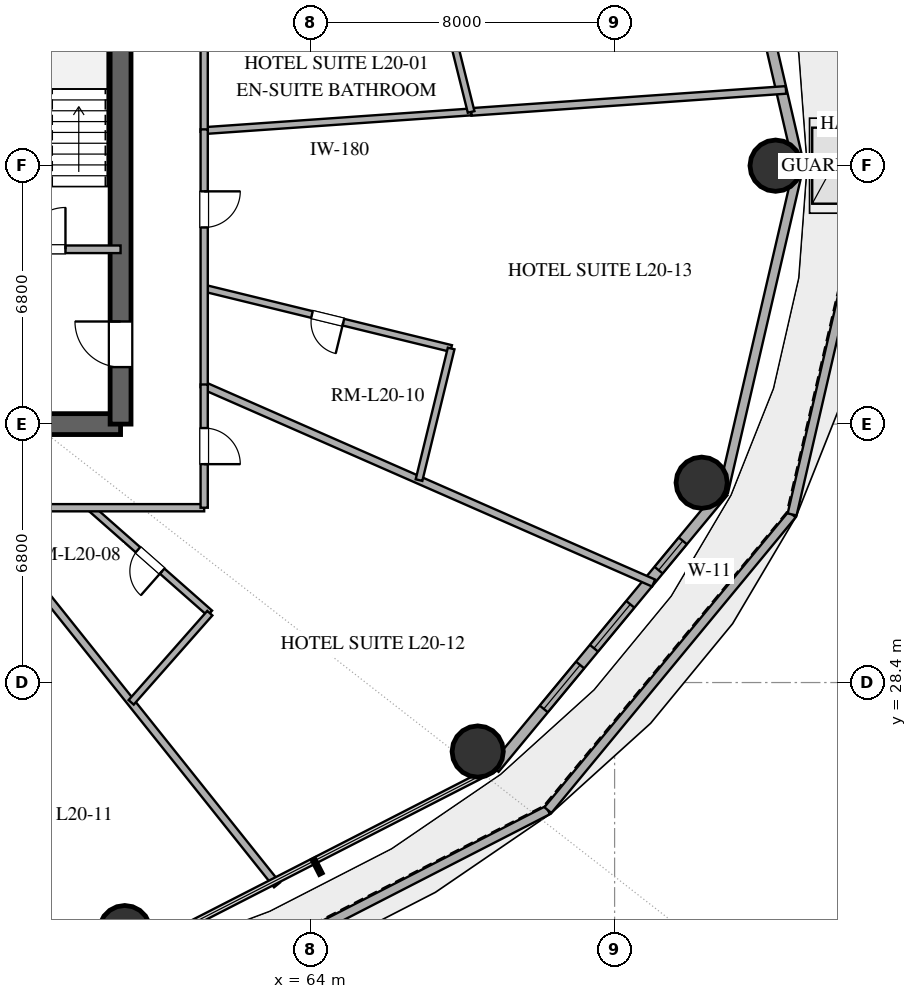
"""IFC4 building model, lengths in metres.
Left out: names, types, materials, properties, quantities, classifications, styles, units other than length and angle.
Written with IfcOpenShell. Run it as: python <this file> out.ifc"""

import sys

from ifc_helpers import new_model, si_unit, direction, frame, frame_2d, origin, origin_2d, place, context, subcontext, project, spatial, rectangle, hollow_circle, extrude, element, fill, save


model = new_model("IFC4")
c1 = context("Model", 3, precision=1e-05, world=origin(), true_north=direction((0.0, 1.0)))
c2 = subcontext(c1, "Body", "Model", "MODEL_VIEW")
j1 = project(units=[si_unit("LENGTHUNIT", "METRE"), si_unit("PLANEANGLEUNIT", "RADIAN")], contexts=[c1])
p1 = place(None, origin())
s1 = spatial("IfcSite", under=j1, at=p1, CompositionType="ELEMENT")
p2 = place(p1, origin())
s2 = spatial("IfcBuilding", under=s1, at=p2, CompositionType="ELEMENT")
p3 = place(p2, frame((0.0, 0.0, 84.0)))
s3 = spatial("IfcBuildingStorey", under=s2, at=p3, CompositionType="ELEMENT", Elevation=84.0)
p4 = place(p3, frame((55.0, 35.2, 0.0), z_axis=(0.0, 0.0, 1.0), x_axis=(1.0, 0.0, 0.0)))
e1 = element("IfcWall", 1, at=p4, inside=s3, PredefinedType="SHEAR", context=c2, shape_type="SweptSolid", body=[
    extrude(rectangle(XDim=4.0, YDim=0.55, at=frame_2d((2.0, 0.0))), origin(), (0.0, 0.0, 1.0), 3.38),
])
p5 = place(p3, frame((59.0, 35.2, 0.0), z_axis=(0.0, 0.0, 1.0), x_axis=(0.0, 1.0, 0.0)))
e2 = element("IfcWall", 2, at=p5, inside=s3, PredefinedType="SHEAR", context=c2, shape_type="SweptSolid", body=[
    extrude(rectangle(XDim=13.6, YDim=0.55, at=frame_2d((6.8, 0.0))), origin(), (0.0, 0.0, 1.0), 3.38),
])
p6 = place(p5, frame((1.5, 0.0, 0.0)))
e3 = element("IfcOpeningElement", 3, at=p6, cuts=e2, PredefinedType="OPENING", context=c2, shape_type="SweptSolid", body=[
    extrude(rectangle(XDim=1.2, YDim=2.15, at=frame_2d((0.6, 1.075))), frame((0.0, 0.285, 0.0), z_axis=(0.0, -1.0, 0.0), x_axis=(1.0, 0.0, 0.0)), (0.0, 0.0, 1.0), 0.57),
])
for number, where, z_axis, x_axis in (
    (4, (76.237, 42.0, 0.0), (0.0, 0.0, 1.0), (1.0, 0.0, 0.0)),
    (5, (59.11, 21.859, 0.0), (0.0, 0.0, 1.0), (1.0, 0.0, 0.0)),
    (6, (68.398, 26.585, 0.0), (0.0, 0.0, 1.0), (1.0, 0.0, 0.0)),
    (7, (74.291, 33.657, 0.0), (0.0, 0.0, 1.0), (1.0, 0.0, 0.0)),
):
    element("IfcColumn", number, at=place(p3, frame(where, z_axis=z_axis, x_axis=x_axis)), inside=s3, PredefinedType="COLUMN", context=c2, shape_type="SweptSolid", body=[
        extrude(hollow_circle(Radius=0.675, WallThickness=0.036, at=origin_2d()), origin(), (0.0, 0.0, 1.0), 3.38),
    ])
p7 = place(p3, frame((78.793, 42.0, 0.0), z_axis=(0.0, 0.0, 1.0), x_axis=(-0.225249461705, 0.974301123884, 0.0)))
e8 = element("IfcWall", 8, at=p7, inside=s3, PredefinedType="PARAPET", context=c2, shape_type="SweptSolid", body=[
    extrude(rectangle(XDim=9.419, YDim=0.24, at=frame_2d((4.709, 0.0))), origin(), (0.0, 0.0, 1.0), 1.25),
])
p8 = place(p3, frame((60.116, 19.845, 0.0), z_axis=(0.0, 0.0, 1.0), x_axis=(0.889663800129, 0.456616165658, 0.0)))
e9 = element("IfcWall", 9, at=p8, inside=s3, PredefinedType="PARAPET", context=c2, shape_type="SweptSolid", body=[
    extrude(rectangle(XDim=11.384, YDim=0.24, at=frame_2d((5.692, 0.0))), origin(), (0.0, 0.0, 1.0), 1.25),
])
p9 = place(p3, frame((70.244, 25.044, 0.0), z_axis=(0.0, 0.0, 1.0), x_axis=(0.636906456166, 0.770941091196, 0.0)))
e10 = element("IfcWall", 10, at=p9, inside=s3, PredefinedType="PARAPET", context=c2, shape_type="SweptSolid", body=[
    extrude(rectangle(XDim=10.091, YDim=0.24, at=frame_2d((5.045, 0.0))), origin(), (0.0, 0.0, 1.0), 1.25),
])
p10 = place(p3, frame((76.671, 32.823, 0.0), z_axis=(0.0, 0.0, 1.0), x_axis=(0.225249461705, 0.974301123884, 0.0)))
e11 = element("IfcWall", 11, at=p10, inside=s3, PredefinedType="PARAPET", context=c2, shape_type="SweptSolid", body=[
    extrude(rectangle(XDim=9.419, YDim=0.24, at=frame_2d((4.709, 0.0))), origin(), (0.0, 0.0, 1.0), 1.25),
])
p11 = place(p3, frame((76.849, 42.0, 0.0), z_axis=(0.0, 0.0, 1.0), x_axis=(-0.22558597182, 0.974223264616, 0.0)))
e12 = element("IfcWall", 12, at=p11, inside=s3, PredefinedType="SOLIDWALL", context=c2, shape_type="SweptSolid", body=[
    extrude(rectangle(XDim=8.811, YDim=0.28, at=frame_2d((4.405, 0.0))), origin(), (0.0, 0.0, 1.0), 3.38),
])
p12 = place(p11, frame((5.675, 0.0, 0.0)))
e13 = element("IfcOpeningElement", 13, at=p12, cuts=e12, PredefinedType="OPENING", context=c2, shape_type="SweptSolid", body=[
    extrude(rectangle(XDim=1.6, YDim=2.25, at=frame_2d((0.8, 1.125))), frame((0.0, 0.15, 0.0), z_axis=(0.0, -1.0, 0.0), x_axis=(1.0, 0.0, 0.0)), (0.0, 0.0, 1.0), 0.3),
])
p13 = place(p3, frame((68.84, 26.14, 0.0), z_axis=(0.0, 0.0, 1.0), x_axis=(0.637505817448, 0.770445541696, 0.0)))
e14 = element("IfcWall", 14, at=p13, inside=s3, PredefinedType="SOLIDWALL", context=c2, shape_type="SweptSolid", body=[
    extrude(rectangle(XDim=9.445, YDim=0.28, at=frame_2d((4.723, 0.0))), origin(), (0.0, 0.0, 1.0), 3.38),
])
p14 = place(p13, frame((2.033, 0.0, 0.85)))
e15 = element("IfcOpeningElement", 15, at=p14, cuts=e14, PredefinedType="OPENING", context=c2, shape_type="SweptSolid", body=[
    extrude(rectangle(XDim=1.5, YDim=2.0, at=frame_2d((0.75, 1.0))), frame((0.0, 0.15, 0.0), z_axis=(0.0, -1.0, 0.0), x_axis=(1.0, 0.0, 0.0)), (0.0, 0.0, 1.0), 0.3),
])
p15 = place(p13, frame((4.105, 0.0, 0.85)))
e16 = element("IfcOpeningElement", 16, at=p15, cuts=e14, PredefinedType="OPENING", context=c2, shape_type="SweptSolid", body=[
    extrude(rectangle(XDim=1.5, YDim=2.0, at=frame_2d((0.75, 1.0))), frame((0.0, 0.15, 0.0), z_axis=(0.0, -1.0, 0.0), x_axis=(1.0, 0.0, 0.0)), (0.0, 0.0, 1.0), 0.3),
])
p16 = place(p13, frame((6.772, 0.0, 0.85)))
e17 = element("IfcOpeningElement", 17, at=p16, cuts=e14, PredefinedType="OPENING", context=c2, shape_type="SweptSolid", body=[
    extrude(rectangle(XDim=1.0, YDim=1.8, at=frame_2d((0.5, 0.9))), frame((0.0, 0.15, 0.0), z_axis=(0.0, -1.0, 0.0), x_axis=(1.0, 0.0, 0.0)), (0.0, 0.0, 1.0), 0.3),
])
p17 = place(p3, frame((74.861, 33.417, 0.0), z_axis=(0.0, 0.0, 1.0), x_axis=(0.22558597182, 0.974223264616, 0.0)))
e18 = element("IfcWall", 18, at=p17, inside=s3, PredefinedType="SOLIDWALL", context=c2, shape_type="SweptSolid", body=[
    extrude(rectangle(XDim=8.811, YDim=0.25, at=frame_2d((4.405, 0.0))), origin(), (0.0, 0.0, 1.0), 3.38),
])
p18 = place(p3, frame((55.0, 39.8, 0.0), z_axis=(0.0, 0.0, 1.0), x_axis=(1.0, 0.0, 0.0)))
e19 = element("IfcWall", 19, at=p18, inside=s3, PredefinedType="SOLIDWALL", context=c2, shape_type="SweptSolid", body=[
    extrude(rectangle(XDim=4.0, YDim=0.2, at=frame_2d((2.0, 0.0))), origin(), (0.0, 0.0, 1.0), 2.74),
])
p19 = place(p18, frame((1.45, 0.0, 0.0)))
e20 = element("IfcOpeningElement", 20, at=p19, cuts=e19, PredefinedType="OPENING", context=c2, shape_type="SweptSolid", body=[
    extrude(rectangle(XDim=1.1, YDim=2.15, at=frame_2d((0.55, 1.075))), frame((0.0, 0.11, 0.0), z_axis=(0.0, -1.0, 0.0), x_axis=(1.0, 0.0, 0.0)), (0.0, 0.0, 1.0), 0.22),
])
p20 = place(p3, frame((76.509, 43.994, 0.0), z_axis=(0.0, 0.0, 1.0), x_axis=(-0.997563838401, -0.069759503404, 0.0)))
e21 = element("IfcWall", 21, at=p20, inside=s3, PredefinedType="PARTITIONING", context=c2, shape_type="SweptSolid", body=[
    extrude(rectangle(XDim=8.305, YDim=0.2, at=frame_2d((4.152, 0.0))), origin(), (0.0, 0.0, 1.0), 2.74),
])
p21 = place(p3, frame((68.224, 43.414, 0.0), z_axis=(0.0, 0.0, 1.0), x_axis=(-0.997563891584, -0.06975874287, 0.0)))
e22 = element("IfcWall", 22, at=p21, inside=s3, PredefinedType="PLUMBINGWALL", context=c2, shape_type="SweptSolid", body=[
    extrude(rectangle(XDim=7.042, YDim=0.18, at=frame_2d((3.521, 0.0))), origin(), (0.0, 0.0, 1.0), 2.74),
])
p22 = place(p3, frame((61.2, 36.208, 0.0), z_axis=(0.0, 0.0, 1.0), x_axis=(0.915722078144, -0.401812239235, 0.0)))
e23 = element("IfcWall", 23, at=p22, inside=s3, PredefinedType="PARTITIONING", context=c2, shape_type="SweptSolid", body=[
    extrude(rectangle(XDim=12.915, YDim=0.2, at=frame_2d((6.458, 0.0))), origin(), (0.0, 0.0, 1.0), 2.74),
])
p23 = place(p3, frame((67.699, 37.189, 0.0), z_axis=(0.0, 0.0, 1.0), x_axis=(-0.971448370468, 0.237251055878, 0.0)))
e24 = element("IfcWall", 24, at=p23, inside=s3, PredefinedType="PLUMBINGWALL", context=c2, shape_type="SweptSolid", body=[
    extrude(rectangle(XDim=6.69, YDim=0.18, at=frame_2d((3.345, 0.0))), origin(), (0.0, 0.0, 1.0), 2.74),
])
p24 = place(p23, frame((2.92, 0.0, 0.0)))
e25 = element("IfcOpeningElement", 25, at=p24, cuts=e24, PredefinedType="OPENING", context=c2, shape_type="SweptSolid", body=[
    extrude(rectangle(XDim=0.85, YDim=2.1, at=frame_2d((0.425, 1.05))), frame((0.0, 0.1, 0.0), z_axis=(0.0, -1.0, 0.0), x_axis=(1.0, 0.0, 0.0)), (0.0, 0.0, 1.0), 0.2),
])
p25 = place(p3, frame((55.189, 33.0, 0.0), z_axis=(0.0, 0.0, 1.0), x_axis=(0.624085468444, -0.781356082767, 0.0)))
e26 = element("IfcWall", 26, at=p25, inside=s3, PredefinedType="PARTITIONING", context=c2, shape_type="SweptSolid", body=[
    extrude(rectangle(XDim=12.703, YDim=0.2, at=frame_2d((6.352, 0.0))), origin(), (0.0, 0.0, 1.0), 2.74),
])
p26 = place(p3, frame((61.2, 51.0, 0.0), z_axis=(0.0, 0.0, 1.0), x_axis=(0.0, -1.0, 0.0)))
e27 = element("IfcWall", 27, at=p26, inside=s3, PredefinedType="PARTITIONING", context=c2, shape_type="SweptSolid", body=[
    extrude(rectangle(XDim=8.109, YDim=0.19, at=frame_2d((4.055, 0.0))), origin(), (0.0, 0.0, 1.0), 2.74),
])
p27 = place(p26, frame((2.806, 0.0, 0.0)))
e28 = element("IfcOpeningElement", 28, at=p27, cuts=e27, PredefinedType="OPENING", context=c2, shape_type="SweptSolid", body=[
    extrude(rectangle(XDim=0.95, YDim=2.15, at=frame_2d((0.475, 1.075))), frame((0.0, 0.105, 0.0), z_axis=(0.0, -1.0, 0.0), x_axis=(1.0, 0.0, 0.0)), (0.0, 0.0, 1.0), 0.21),
])
p28 = place(p3, frame((61.2, 42.955, 0.0), z_axis=(0.0, 0.0, 1.0), x_axis=(0.0, -1.0, 0.0)))
e29 = element("IfcWall", 29, at=p28, inside=s3, PredefinedType="PARTITIONING", context=c2, shape_type="SweptSolid", body=[
    extrude(rectangle(XDim=6.782, YDim=0.19, at=frame_2d((3.391, 0.0))), origin(), (0.0, 0.0, 1.0), 2.74),
])
p29 = place(p28, frame((1.631, 0.0, 0.0)))
e30 = element("IfcOpeningElement", 30, at=p29, cuts=e29, PredefinedType="OPENING", context=c2, shape_type="SweptSolid", body=[
    extrude(rectangle(XDim=0.95, YDim=2.15, at=frame_2d((0.475, 1.075))), frame((0.0, 0.105, 0.0), z_axis=(0.0, -1.0, 0.0), x_axis=(1.0, 0.0, 0.0)), (0.0, 0.0, 1.0), 0.21),
])
p30 = place(p3, frame((61.348, 30.225, 0.0), z_axis=(0.0, 0.0, 1.0), x_axis=(-0.749931272561, 0.661515749197, 0.0)))
e31 = element("IfcWall", 31, at=p30, inside=s3, PredefinedType="PLUMBINGWALL", context=c2, shape_type="SweptSolid", body=[
    extrude(rectangle(XDim=4.194, YDim=0.18, at=frame_2d((2.097, 0.0))), origin(), (0.0, 0.0, 1.0), 2.74),
])
p31 = place(p30, frame((1.672, 0.0, 0.0)))
e32 = element("IfcOpeningElement", 32, at=p31, cuts=e31, PredefinedType="OPENING", context=c2, shape_type="SweptSolid", body=[
    extrude(rectangle(XDim=0.85, YDim=2.1, at=frame_2d((0.425, 1.05))), frame((0.0, 0.1, 0.0), z_axis=(0.0, -1.0, 0.0), x_axis=(1.0, 0.0, 0.0)), (0.0, 0.0, 1.0), 0.2),
])
p32 = place(p3, frame((61.2, 33.0, 0.0), z_axis=(0.0, 0.0, 1.0), x_axis=(-1.0, 0.0, 0.0)))
e33 = element("IfcWall", 33, at=p32, inside=s3, PredefinedType="PARTITIONING", context=c2, shape_type="SweptSolid", body=[
    extrude(rectangle(XDim=11.496, YDim=0.19, at=frame_2d((5.748, 0.0))), origin(), (0.0, 0.0, 1.0), 2.74),
])
p33 = place(p32, frame((7.41, 0.0, 0.0)))
e34 = element("IfcOpeningElement", 34, at=p33, cuts=e33, PredefinedType="OPENING", context=c2, shape_type="SweptSolid", body=[
    extrude(rectangle(XDim=0.95, YDim=2.15, at=frame_2d((0.475, 1.075))), frame((0.0, 0.105, 0.0), z_axis=(0.0, -1.0, 0.0), x_axis=(1.0, 0.0, 0.0)), (0.0, 0.0, 1.0), 0.21),
])
p34 = place(p3, frame((66.853, 33.727, 0.0), z_axis=(0.0, 0.0, 1.0), x_axis=(0.237213207876, 0.971457613079, 0.0)))
e35 = element("IfcWall", 35, at=p34, inside=s3, PredefinedType="PLUMBINGWALL", context=c2, shape_type="SweptSolid", body=[
    extrude(rectangle(XDim=3.564, YDim=0.18, at=frame_2d((1.782, 0.0))), origin(), (0.0, 0.0, 1.0), 2.74),
])
p35 = place(p3, frame((67.377, 46.82, 0.0), z_axis=(0.0, 0.0, 1.0), x_axis=(0.241373388957, -0.970432319692, 0.0)))
e36 = element("IfcWall", 36, at=p35, inside=s3, PredefinedType="PLUMBINGWALL", context=c2, shape_type="SweptSolid", body=[
    extrude(rectangle(XDim=3.51, YDim=0.18, at=frame_2d((1.755, 0.0))), origin(), (0.0, 0.0, 1.0), 2.74),
])
p36 = place(p3, frame((61.2, 36.243, 0.0), z_axis=(0.0, 0.0, 1.0), x_axis=(0.0, -1.0, 0.0)))
e37 = element("IfcWall", 37, at=p36, inside=s3, PredefinedType="PARTITIONING", context=c2, shape_type="SweptSolid", body=[
    extrude(rectangle(XDim=3.243, YDim=0.19, at=frame_2d((1.621, 0.0))), origin(), (0.0, 0.0, 1.0), 2.74),
])
p37 = place(p36, frame((1.146, 0.0, 0.0)))
e38 = element("IfcOpeningElement", 38, at=p37, cuts=e37, PredefinedType="OPENING", context=c2, shape_type="SweptSolid", body=[
    extrude(rectangle(XDim=0.95, YDim=2.15, at=frame_2d((0.475, 1.075))), frame((0.0, 0.105, 0.0), z_axis=(0.0, -1.0, 0.0), x_axis=(1.0, 0.0, 0.0)), (0.0, 0.0, 1.0), 0.21),
])
p38 = place(p3, frame((59.279, 27.879, 0.0), z_axis=(0.0, 0.0, 1.0), x_axis=(0.661515810511, 0.749931218475, 0.0)))
e39 = element("IfcWall", 39, at=p38, inside=s3, PredefinedType="PLUMBINGWALL", context=c2, shape_type="SweptSolid", body=[
    extrude(rectangle(XDim=3.129, YDim=0.18, at=frame_2d((1.564, 0.0))), origin(), (0.0, 0.0, 1.0), 2.74),
])
p39 = place(p3, origin())
p40 = place(p39, frame((77.75, 42.0, 0.0)))
p41 = place(p40, frame((0.0, 0.0, 0.11)))
e40 = element("IfcDoor", 40, at=p41, inside=s3, OperationType="SINGLE_SWING_LEFT", PredefinedType="TRAPDOOR", context=c2, shape_type="SweptSolid", body=[
    extrude(rectangle(XDim=1.1, YDim=2.0, at=origin_2d()), origin(), (0.0, 0.0, 1.0), 0.05),
])
p42 = place(p14, origin())
e41 = element("IfcWindow", 41, at=p42, inside=s3, PartitioningType="SINGLE_PANEL", PredefinedType="WINDOW", context=c2, shape_type="SweptSolid", body=[
    extrude(rectangle(XDim=1.5, YDim=2.0, at=frame_2d((0.75, 1.0))), frame((0.0, 0.03, 0.0), z_axis=(0.0, -1.0, 0.0), x_axis=(1.0, 0.0, 0.0)), (0.0, 0.0, 1.0), 0.06),
])
fill(e15, e41)
p43 = place(p15, origin())
e42 = element("IfcWindow", 42, at=p43, inside=s3, PartitioningType="SINGLE_PANEL", PredefinedType="WINDOW", context=c2, shape_type="SweptSolid", body=[
    extrude(rectangle(XDim=1.5, YDim=2.0, at=frame_2d((0.75, 1.0))), frame((0.0, 0.03, 0.0), z_axis=(0.0, -1.0, 0.0), x_axis=(1.0, 0.0, 0.0)), (0.0, 0.0, 1.0), 0.06),
])
fill(e16, e42)
p44 = place(p16, origin())
e43 = element("IfcWindow", 43, at=p44, inside=s3, PartitioningType="SINGLE_PANEL", PredefinedType="WINDOW", context=c2, shape_type="SweptSolid", body=[
    extrude(rectangle(XDim=1.0, YDim=1.8, at=frame_2d((0.5, 0.9))), frame((0.0, 0.03, 0.0), z_axis=(0.0, -1.0, 0.0), x_axis=(1.0, 0.0, 0.0)), (0.0, 0.0, 1.0), 0.06),
])
fill(e17, e43)
p45 = place(p6, origin())
e44 = element("IfcDoor", 44, at=p45, inside=s3, OperationType="SINGLE_SWING_RIGHT", PredefinedType="DOOR", context=c2, shape_type="SweptSolid", body=[
    extrude(rectangle(XDim=1.2, YDim=2.15, at=frame_2d((0.6, 1.075))), frame((0.0, 0.025, 0.0), z_axis=(0.0, -1.0, 0.0), x_axis=(1.0, 0.0, 0.0)), (0.0, 0.0, 1.0), 0.05),
])
fill(e3, e44)
p46 = place(p19, origin())
e45 = element("IfcDoor", 45, at=p46, inside=s3, OperationType="SINGLE_SWING_RIGHT", PredefinedType="DOOR", context=c2, shape_type="SweptSolid", body=[
    extrude(rectangle(XDim=1.1, YDim=2.15, at=frame_2d((0.55, 1.075))), frame((0.0, 0.025, 0.0), z_axis=(0.0, -1.0, 0.0), x_axis=(1.0, 0.0, 0.0)), (0.0, 0.0, 1.0), 0.05),
])
fill(e20, e45)
p47 = place(p24, origin())
e46 = element("IfcDoor", 46, at=p47, inside=s3, OperationType="SINGLE_SWING_LEFT", PredefinedType="DOOR", context=c2, shape_type="SweptSolid", body=[
    extrude(rectangle(XDim=0.85, YDim=2.1, at=frame_2d((0.425, 1.05))), frame((0.0, 0.025, 0.0), z_axis=(0.0, -1.0, 0.0), x_axis=(1.0, 0.0, 0.0)), (0.0, 0.0, 1.0), 0.05),
])
fill(e25, e46)
p48 = place(p29, origin())
e47 = element("IfcDoor", 47, at=p48, inside=s3, OperationType="SINGLE_SWING_LEFT", PredefinedType="DOOR", context=c2, shape_type="SweptSolid", body=[
    extrude(rectangle(XDim=0.95, YDim=2.15, at=frame_2d((0.475, 1.075))), frame((0.0, 0.025, 0.0), z_axis=(0.0, -1.0, 0.0), x_axis=(1.0, 0.0, 0.0)), (0.0, 0.0, 1.0), 0.05),
])
fill(e30, e47)
p49 = place(p31, origin())
e48 = element("IfcDoor", 48, at=p49, inside=s3, OperationType="SINGLE_SWING_LEFT", PredefinedType="DOOR", context=c2, shape_type="SweptSolid", body=[
    extrude(rectangle(XDim=0.85, YDim=2.1, at=frame_2d((0.425, 1.05))), frame((0.0, 0.025, 0.0), z_axis=(0.0, -1.0, 0.0), x_axis=(1.0, 0.0, 0.0)), (0.0, 0.0, 1.0), 0.05),
])
fill(e32, e48)
p50 = place(p37, origin())
e49 = element("IfcDoor", 49, at=p50, inside=s3, OperationType="SINGLE_SWING_RIGHT", PredefinedType="DOOR", context=c2, shape_type="SweptSolid", body=[
    extrude(rectangle(XDim=0.95, YDim=2.15, at=frame_2d((0.475, 1.075))), frame((0.0, 0.025, 0.0), z_axis=(0.0, -1.0, 0.0), x_axis=(1.0, 0.0, 0.0)), (0.0, 0.0, 1.0), 0.05),
])
fill(e38, e49)
save(model, sys.argv[1])
